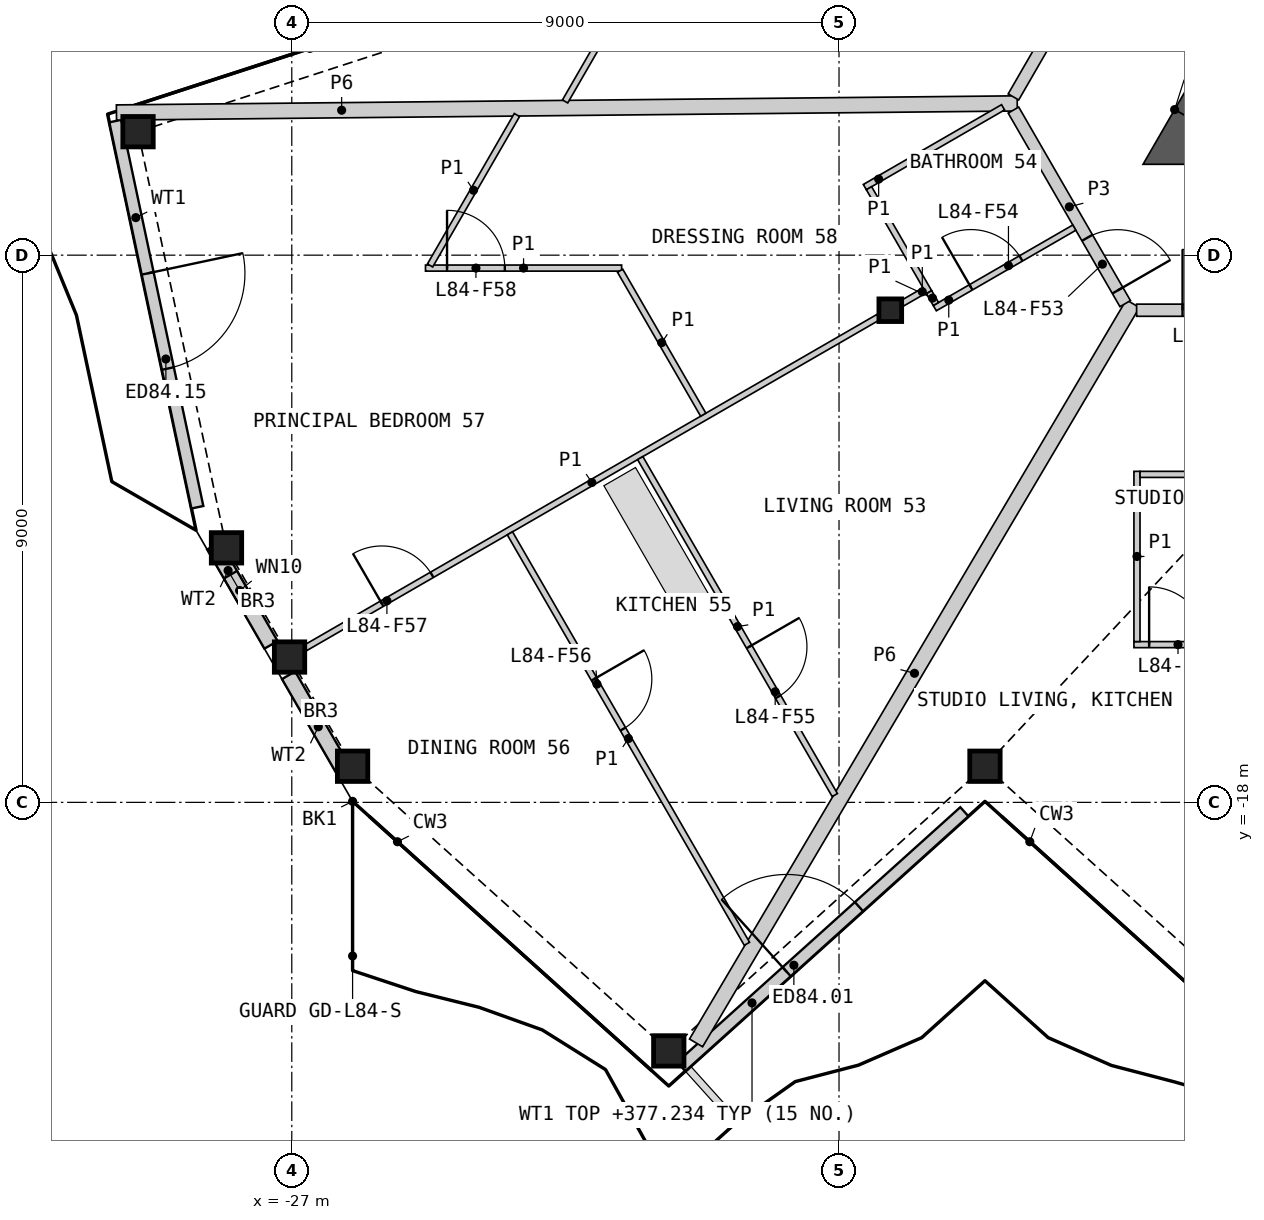
"""IFC4 building model, lengths in metres.
Left out: names, types, materials, properties, quantities, classifications, styles, units other than length and angle.
Written with IfcOpenShell. Run it as: python <this file> out.ifc"""

import sys

from ifc_helpers import new_model, si_unit, direction, frame, frame_2d, origin, origin_2d, place, context, subcontext, project, spatial, polyline, rectangle, hollow_rectangle, i_section, outline, extrude, element, fill, save


model = new_model("IFC4")
c1 = context("Model", 3, precision=1e-05, world=origin(), true_north=direction((0.0, 1.0)))
c2 = subcontext(c1, "Body", "Model", "MODEL_VIEW")
j1 = project(units=[si_unit("LENGTHUNIT", "METRE"), si_unit("PLANEANGLEUNIT", "RADIAN")], contexts=[c1])
p1 = place(None, origin())
s1 = spatial("IfcSite", under=j1, at=p1, CompositionType="ELEMENT")
p2 = place(p1, origin())
s2 = spatial("IfcBuilding", under=s1, at=p2, CompositionType="ELEMENT")
p3 = place(p2, frame((0.0, 0.0, 374.6)))
s3 = spatial("IfcBuildingStorey", under=s2, at=p3, CompositionType="ELEMENT", Elevation=374.6)
for number, where, z_axis, x_axis in (
    (1, (-26.0, -17.406, 0.0), (0.0, 0.0, 1.0), (1.0, 0.0, 0.0)),
    (2, (-20.8, -22.088, 0.0), (0.0, 0.0, 1.0), (1.0, 0.0, 0.0)),
    (3, (-15.6, -17.406, 0.0), (0.0, 0.0, 1.0), (1.0, 0.0, 0.0)),
    (4, (-29.529, -6.969, 0.0), (0.0, 0.0, 1.0), (1.0, 0.0, 0.0)),
    (5, (-28.074, -13.814, 0.0), (0.0, 0.0, 1.0), (1.0, 0.0, 0.0)),
    (6, (-27.037, -15.61, 0.0), (0.0, 0.0, 1.0), (1.0, 0.0, 0.0)),
):
    element("IfcColumn", number, at=place(p3, frame(where, z_axis=z_axis, x_axis=x_axis)), inside=s3, PredefinedType="COLUMN", context=c2, shape_type="SweptSolid", body=[
        extrude(hollow_rectangle(XDim=0.5, YDim=0.5, WallThickness=0.03, at=origin_2d()), origin(), (0.0, 0.0, 1.0), 3.4),
    ])
p4 = place(p3, frame((-17.157, -9.906, 0.0), z_axis=(0.0, 0.0, 1.0), x_axis=(1.0, 0.0, 0.0)))
e7 = element("IfcColumn", 7, at=p4, inside=s3, PredefinedType="COLUMN", context=c2, shape_type="SweptSolid", body=[
    extrude(i_section(OverallWidth=0.374, OverallDepth=0.372, WebThickness=0.016, FlangeThickness=0.026, at=origin_2d()), origin(), (0.0, 0.0, 1.0), 3.4),
])
p5 = place(p3, frame((-20.595, -22.346, 0.0), z_axis=(0.0, 0.0, 1.0), x_axis=(0.743137181878, 0.669139095339, 0.0)))
e8 = element("IfcWall", 8, at=p5, inside=s3, PredefinedType="SOLIDWALL", context=c2, shape_type="SweptSolid", body=[
    extrude(rectangle(XDim=6.265, YDim=0.2, at=frame_2d((3.133, 0.0))), origin(), (0.0, 0.0, 1.0), 2.634),
])
p6 = place(p5, frame((2.333, 0.0, 0.0)))
e9 = element("IfcOpeningElement", 9, at=p6, cuts=e8, PredefinedType="OPENING", context=c2, shape_type="SweptSolid", body=[
    extrude(rectangle(XDim=1.6, YDim=2.25, at=frame_2d((0.8, 1.125))), frame((0.0, 0.11, 0.0), z_axis=(0.0, -1.0, 0.0), x_axis=(1.0, 0.0, 0.0)), (0.0, 0.0, 1.0), 0.22),
])
p7 = place(p3, frame((-29.903, -6.795, 0.0), z_axis=(0.0, 0.0, 1.0), x_axis=(0.207923959653, -0.978144992832, 0.0)))
e10 = element("IfcWall", 10, at=p7, inside=s3, PredefinedType="SOLIDWALL", context=c2, shape_type="SweptSolid", body=[
    extrude(rectangle(XDim=6.493, YDim=0.2, at=frame_2d((3.247, 0.0))), origin(), (0.0, 0.0, 1.0), 2.634),
])
p8 = place(p7, frame((2.561, 0.0, 0.0)))
e11 = element("IfcOpeningElement", 11, at=p8, cuts=e10, PredefinedType="OPENING", context=c2, shape_type="SweptSolid", body=[
    extrude(rectangle(XDim=1.6, YDim=2.25, at=frame_2d((0.8, 1.125))), frame((0.0, 0.11, 0.0), z_axis=(0.0, -1.0, 0.0), x_axis=(1.0, 0.0, 0.0)), (0.0, 0.0, 1.0), 0.22),
])
p9 = place(p3, frame((-28.283, -13.779, 0.0), z_axis=(0.0, 0.0, 1.0), x_axis=(0.500044242988, -0.865999858577, 0.0)))
e12 = element("IfcWall", 12, at=p9, inside=s3, PredefinedType="SOLIDWALL", context=c2, shape_type="SweptSolid", body=[
    extrude(rectangle(XDim=1.883, YDim=0.25, at=frame_2d((0.941, 0.0))), origin(), (0.0, 0.0, 1.0), 2.634),
])
p10 = place(p9, frame((0.55, 0.0, 0.4)))
e13 = element("IfcOpeningElement", 13, at=p10, cuts=e12, PredefinedType="OPENING", context=c2, shape_type="SweptSolid", body=[
    extrude(rectangle(XDim=0.6, YDim=0.6, at=frame_2d((0.3, 0.3))), frame((0.0, 0.135, 0.0), z_axis=(0.0, -1.0, 0.0), x_axis=(1.0, 0.0, 0.0)), (0.0, 0.0, 1.0), 0.27),
])
p11 = place(p3, frame((-27.053, -15.91, 0.0), z_axis=(0.0, 0.0, 1.0), x_axis=(0.500017700655, -0.866015184065, 0.0)))
e14 = element("IfcWall", 14, at=p11, inside=s3, PredefinedType="SOLIDWALL", context=c2, shape_type="SweptSolid", body=[
    extrude(rectangle(XDim=1.957, YDim=0.25, at=frame_2d((0.978, 0.0))), origin(), (0.0, 0.0, 1.0), 2.634),
])
p12 = place(p3, frame((-9.941, -2.807, 0.0), z_axis=(0.0, 0.0, 1.0), x_axis=(-0.500020646047, -0.866013483456, 0.0)))
e15 = element("IfcWall", 15, at=p12, inside=s3, PredefinedType="SHEAR", context=c2, shape_type="SweptSolid", body=[
    extrude(rectangle(XDim=4.559, YDim=0.6, at=frame_2d((2.28, 0.0))), origin(), (0.0, 0.0, 1.0), 3.1),
])
p13 = place(p3, origin())
e16 = element("IfcWall", 16, at=p13, inside=s3, PredefinedType="SHEAR", context=c2, shape_type="SweptSolid", body=[
    extrude(outline(polyline([(-12.48, -6.606), (-11.961, -6.906), (-11.961, -7.506), (-13.0, -7.506), (-12.48, -6.606)])), origin(), (0.0, 0.0, 1.0), 3.1),
])
p14 = place(p3, frame((-29.883, -6.654, 0.0), z_axis=(0.0, 0.0, 1.0), x_axis=(0.999949143254, 0.010085182526, 0.0)))
e17 = element("IfcWall", 17, at=p14, inside=s3, PredefinedType="PARTITIONING", context=c2, shape_type="SweptSolid", body=[
    extrude(rectangle(XDim=14.815, YDim=0.25, at=frame_2d((7.408, 0.0))), origin(), (0.0, 0.0, 1.0), 2.33),
])
p15 = place(p3, frame((-20.351, -21.956, 0.0), z_axis=(0.0, 0.0, 1.0), x_axis=(0.508713003719, 0.860936164793, 0.0)))
e18 = element("IfcWall", 18, at=p15, inside=s3, PredefinedType="PARTITIONING", context=c2, shape_type="SweptSolid", body=[
    extrude(rectangle(XDim=14.122, YDim=0.25, at=frame_2d((7.061, 0.0))), origin(), (0.0, 0.0, 1.0), 2.33),
])
p16 = place(p3, frame((-13.106, -9.906, 0.0), z_axis=(0.0, 0.0, 1.0), x_axis=(1.0, 0.0, 0.0)))
e19 = element("IfcWall", 19, at=p16, inside=s3, PredefinedType="PARTITIONING", context=c2, shape_type="SweptSolid", body=[
    extrude(rectangle(XDim=4.331, YDim=0.2, at=frame_2d((2.165, 0.0))), origin(), (0.0, 0.0, 1.0), 3.1),
])
p17 = place(p16, frame((0.755, 0.0, 0.0)))
e20 = element("IfcOpeningElement", 20, at=p17, cuts=e19, PredefinedType="OPENING", context=c2, shape_type="SweptSolid", body=[
    extrude(rectangle(XDim=1.0, YDim=2.1, at=frame_2d((0.5, 1.05))), frame((0.0, 0.11, 0.0), z_axis=(0.0, -1.0, 0.0), x_axis=(1.0, 0.0, 0.0)), (0.0, 0.0, 1.0), 0.22),
])
p18 = place(p3, frame((-15.131, -6.397, 0.0), z_axis=(0.0, 0.0, 1.0), x_axis=(0.499986217557, 0.866033360935, 0.0)))
e21 = element("IfcWall", 21, at=p18, inside=s3, PredefinedType="PARTITIONING", context=c2, shape_type="SweptSolid", body=[
    extrude(rectangle(XDim=4.3, YDim=0.2, at=frame_2d((2.15, 0.0))), origin(), (0.0, 0.0, 1.0), 3.1),
])
p19 = place(p3, frame((-15.131, -6.614, 0.0), z_axis=(0.0, 0.0, 1.0), x_axis=(0.499967746641, -0.866044024469, 0.0)))
e22 = element("IfcWall", 22, at=p19, inside=s3, PredefinedType="PARTITIONING", context=c2, shape_type="SweptSolid", body=[
    extrude(rectangle(XDim=3.676, YDim=0.2, at=frame_2d((1.838, 0.0))), origin(), (0.0, 0.0, 1.0), 3.1),
])
p20 = place(p19, frame((2.426, 0.0, 0.0)))
e23 = element("IfcOpeningElement", 23, at=p20, cuts=e22, PredefinedType="OPENING", context=c2, shape_type="SweptSolid", body=[
    extrude(rectangle(XDim=1.0, YDim=2.1, at=frame_2d((0.5, 1.05))), frame((0.0, 0.11, 0.0), z_axis=(0.0, -1.0, 0.0), x_axis=(1.0, 0.0, 0.0)), (0.0, 0.0, 1.0), 0.22),
])
p21 = place(p3, frame((-26.777, -15.46, 0.0), z_axis=(0.0, 0.0, 1.0), x_axis=(0.866019680922, 0.500009912158, 0.0)))
e24 = element("IfcWall", 24, at=p21, inside=s3, PredefinedType="PARTITIONING", context=c2, shape_type="SweptSolid", body=[
    extrude(rectangle(XDim=10.881, YDim=0.1, at=frame_2d((5.44, 0.0))), origin(), (0.0, 0.0, 1.0), 2.33),
])
p22 = place(p21, frame((1.454, 0.0, 0.0)))
e25 = element("IfcOpeningElement", 25, at=p22, cuts=e24, PredefinedType="OPENING", context=c2, shape_type="SweptSolid", body=[
    extrude(rectangle(XDim=0.95, YDim=2.1, at=frame_2d((0.475, 1.05))), frame((0.0, 0.06, 0.0), z_axis=(0.0, -1.0, 0.0), x_axis=(1.0, 0.0, 0.0)), (0.0, 0.0, 1.0), 0.12),
])
p23 = place(p3, frame((-23.413, -13.575, 0.0), z_axis=(0.0, 0.0, 1.0), x_axis=(0.499998958472, -0.86602600511, 0.0)))
e26 = element("IfcWall", 26, at=p23, inside=s3, PredefinedType="PARTITIONING", context=c2, shape_type="SweptSolid", body=[
    extrude(rectangle(XDim=7.796, YDim=0.1, at=frame_2d((3.898, 0.0))), origin(), (0.0, 0.0, 1.0), 2.33),
])
p24 = place(p23, frame((2.768, 0.0, 0.0)))
e27 = element("IfcOpeningElement", 27, at=p24, cuts=e26, PredefinedType="OPENING", context=c2, shape_type="SweptSolid", body=[
    extrude(rectangle(XDim=0.95, YDim=2.1, at=frame_2d((0.475, 1.05))), frame((0.0, 0.06, 0.0), z_axis=(0.0, -1.0, 0.0), x_axis=(1.0, 0.0, 0.0)), (0.0, 0.0, 1.0), 0.12),
])
p25 = place(p3, frame((-22.505, -6.472, 0.0), z_axis=(0.0, 0.0, 1.0), x_axis=(0.499999516514, 0.866025682925, 0.0)))
e28 = element("IfcWall", 28, at=p25, inside=s3, PredefinedType="PARTITIONING", context=c2, shape_type="SweptSolid", body=[
    extrude(rectangle(XDim=6.407, YDim=0.1, at=frame_2d((3.204, 0.0))), origin(), (0.0, 0.0, 1.0), 2.33),
])
p26 = place(p25, frame((2.981, 0.0, 0.0)))
e29 = element("IfcOpeningElement", 29, at=p26, cuts=e28, PredefinedType="OPENING", context=c2, shape_type="SweptSolid", body=[
    extrude(rectangle(XDim=0.95, YDim=2.1, at=frame_2d((0.475, 1.05))), frame((0.0, 0.06, 0.0), z_axis=(0.0, -1.0, 0.0), x_axis=(1.0, 0.0, 0.0)), (0.0, 0.0, 1.0), 0.12),
])
p27 = place(p3, frame((-21.269, -12.337, 0.0), z_axis=(0.0, 0.0, 1.0), x_axis=(0.499983315828, -0.866035036182, 0.0)))
e30 = element("IfcWall", 30, at=p27, inside=s3, PredefinedType="PARTITIONING", context=c2, shape_type="SweptSolid", body=[
    extrude(rectangle(XDim=6.4, YDim=0.1, at=frame_2d((3.2, 0.0))), origin(), (0.0, 0.0, 1.0), 2.33),
])
p28 = place(p27, frame((3.584, 0.0, 0.0)))
e31 = element("IfcOpeningElement", 31, at=p28, cuts=e30, PredefinedType="OPENING", context=c2, shape_type="SweptSolid", body=[
    extrude(rectangle(XDim=0.95, YDim=2.1, at=frame_2d((0.475, 1.05))), frame((0.0, 0.06, 0.0), z_axis=(0.0, -1.0, 0.0), x_axis=(1.0, 0.0, 0.0)), (0.0, 0.0, 1.0), 0.12),
])
p29 = place(p3, frame((-13.15, -15.406, 0.0), z_axis=(0.0, 0.0, 1.0), x_axis=(1.0, 0.0, 0.0)))
e32 = element("IfcWall", 32, at=p29, inside=s3, PredefinedType="PARTITIONING", context=c2, shape_type="SweptSolid", body=[
    extrude(rectangle(XDim=5.5, YDim=0.1, at=frame_2d((2.75, 0.0))), origin(), (0.0, 0.0, 1.0), 2.33),
])
p30 = place(p29, frame((0.25, 0.0, 0.0)))
e33 = element("IfcOpeningElement", 33, at=p30, cuts=e32, PredefinedType="OPENING", context=c2, shape_type="SweptSolid", body=[
    extrude(rectangle(XDim=0.95, YDim=2.1, at=frame_2d((0.475, 1.05))), frame((0.0, 0.06, 0.0), z_axis=(0.0, -1.0, 0.0), x_axis=(1.0, 0.0, 0.0)), (0.0, 0.0, 1.0), 0.12),
])
p31 = place(p29, frame((3.591, 0.0, 0.0)))
e34 = element("IfcOpeningElement", 34, at=p31, cuts=e32, PredefinedType="OPENING", context=c2, shape_type="SweptSolid", body=[
    extrude(rectangle(XDim=0.95, YDim=2.1, at=frame_2d((0.475, 1.05))), frame((0.0, 0.06, 0.0), z_axis=(0.0, -1.0, 0.0), x_axis=(1.0, 0.0, 0.0)), (0.0, 0.0, 1.0), 0.12),
])
p32 = place(p3, frame((-24.801, -9.212, 0.0), z_axis=(0.0, 0.0, 1.0), x_axis=(1.0, 0.0, 0.0)))
e35 = element("IfcWall", 35, at=p32, inside=s3, PredefinedType="PARTITIONING", context=c2, shape_type="SweptSolid", body=[
    extrude(rectangle(XDim=3.226, YDim=0.1, at=frame_2d((1.613, 0.0))), origin(), (0.0, 0.0, 1.0), 2.33),
])
p33 = place(p32, frame((0.354, 0.0, 0.0)))
e36 = element("IfcOpeningElement", 36, at=p33, cuts=e35, PredefinedType="OPENING", context=c2, shape_type="SweptSolid", body=[
    extrude(rectangle(XDim=0.95, YDim=2.1, at=frame_2d((0.475, 1.05))), frame((0.0, 0.06, 0.0), z_axis=(0.0, -1.0, 0.0), x_axis=(1.0, 0.0, 0.0)), (0.0, 0.0, 1.0), 0.12),
])
p34 = place(p3, frame((-24.726, -9.169, 0.0), z_axis=(0.0, 0.0, 1.0), x_axis=(0.499971481985, 0.866041868042, 0.0)))
e37 = element("IfcWall", 37, at=p34, inside=s3, PredefinedType="PARTITIONING", context=c2, shape_type="SweptSolid", body=[
    extrude(rectangle(XDim=2.857, YDim=0.1, at=frame_2d((1.429, 0.0))), origin(), (0.0, 0.0, 1.0), 2.33),
])
p35 = place(p3, frame((-21.6, -9.256, 0.0), z_axis=(0.0, 0.0, 1.0), x_axis=(0.500018733116, -0.866014587945, 0.0)))
e38 = element("IfcWall", 38, at=p35, inside=s3, PredefinedType="PARTITIONING", context=c2, shape_type="SweptSolid", body=[
    extrude(rectangle(XDim=2.734, YDim=0.1, at=frame_2d((1.367, 0.0))), origin(), (0.0, 0.0, 1.0), 2.33),
])
p36 = place(p3, frame((-13.1, -15.356, 0.0), z_axis=(0.0, 0.0, 1.0), x_axis=(0.0, 1.0, 0.0)))
e39 = element("IfcWall", 39, at=p36, inside=s3, PredefinedType="PARTITIONING", context=c2, shape_type="SweptSolid", body=[
    extrude(rectangle(XDim=2.8, YDim=0.1, at=frame_2d((1.4, 0.0))), origin(), (0.0, 0.0, 1.0), 2.33),
])
p37 = place(p3, frame((-17.575, -7.881, 0.0), z_axis=(0.0, 0.0, 1.0), x_axis=(0.866036909293, 0.499980071345, 0.0)))
e40 = element("IfcWall", 40, at=p37, inside=s3, PredefinedType="PARTITIONING", context=c2, shape_type="SweptSolid", body=[
    extrude(rectangle(XDim=2.625, YDim=0.1, at=frame_2d((1.312, 0.0))), origin(), (0.0, 0.0, 1.0), 2.33),
])
p38 = place(p3, frame((-13.05, -12.606, 0.0), z_axis=(0.0, 0.0, 1.0), x_axis=(1.0, 0.0, 0.0)))
e41 = element("IfcWall", 41, at=p38, inside=s3, PredefinedType="PARTITIONING", context=c2, shape_type="SweptSolid", body=[
    extrude(rectangle(XDim=2.525, YDim=0.1, at=frame_2d((1.263, 0.0))), origin(), (0.0, 0.0, 1.0), 2.33),
])
p39 = place(p3, frame((-16.425, -9.872, 0.0), z_axis=(0.0, 0.0, 1.0), x_axis=(0.86603978909, 0.499975083092, 0.0)))
e42 = element("IfcWall", 42, at=p39, inside=s3, PredefinedType="PARTITIONING", context=c2, shape_type="SweptSolid", body=[
    extrude(rectangle(XDim=2.649, YDim=0.1, at=frame_2d((1.325, 0.0))), origin(), (0.0, 0.0, 1.0), 2.33),
])
p40 = place(p39, frame((0.686, 0.0, 0.0)))
e43 = element("IfcOpeningElement", 43, at=p40, cuts=e42, PredefinedType="OPENING", context=c2, shape_type="SweptSolid", body=[
    extrude(rectangle(XDim=0.95, YDim=2.1, at=frame_2d((0.475, 1.05))), frame((0.0, 0.06, 0.0), z_axis=(0.0, -1.0, 0.0), x_axis=(1.0, 0.0, 0.0)), (0.0, 0.0, 1.0), 0.12),
])
p41 = place(p3, frame((-17.507, -7.899, 0.0), z_axis=(0.0, 0.0, 1.0), x_axis=(0.500011643316, -0.866018681408, 0.0)))
e44 = element("IfcWall", 44, at=p41, inside=s3, PredefinedType="PARTITIONING", context=c2, shape_type="SweptSolid", body=[
    extrude(rectangle(XDim=1.973, YDim=0.1, at=frame_2d((0.987, 0.0))), origin(), (0.0, 0.0, 1.0), 2.33),
])
p42 = place(p3, frame((-16.96, -9.792, 0.0), z_axis=(0.0, 0.0, 1.0), x_axis=(0.866137484628, 0.499805820016, 0.0)))
e45 = element("IfcWall", 45, at=p42, inside=s3, PredefinedType="PARTITIONING", context=c2, shape_type="SweptSolid", body=[
    extrude(rectangle(XDim=0.423, YDim=0.1, at=frame_2d((0.211, 0.0))), origin(), (0.0, 0.0, 1.0), 2.33),
])
p43 = place(p3, frame((-16.519, -9.61, 0.0), z_axis=(0.0, 0.0, 1.0), x_axis=(0.50245032488, -0.864606078528, 0.0)))
e46 = element("IfcWall", 46, at=p43, inside=s3, PredefinedType="PARTITIONING", context=c2, shape_type="SweptSolid", body=[
    extrude(rectangle(XDim=0.224, YDim=0.1, at=frame_2d((0.112, 0.0))), origin(), (0.0, 0.0, 1.0), 2.33),
])
p44 = place(p6, origin())
e47 = element("IfcDoor", 47, at=p44, inside=s3, OperationType="DOUBLE_DOOR_SINGLE_SWING", PredefinedType="DOOR", context=c2, shape_type="SweptSolid", body=[
    extrude(rectangle(XDim=1.6, YDim=2.25, at=frame_2d((0.8, 1.125))), frame((0.0, 0.025, 0.0), z_axis=(0.0, -1.0, 0.0), x_axis=(1.0, 0.0, 0.0)), (0.0, 0.0, 1.0), 0.05),
])
fill(e9, e47)
p45 = place(p8, origin())
e48 = element("IfcDoor", 48, at=p45, inside=s3, OperationType="DOUBLE_DOOR_SINGLE_SWING", PredefinedType="DOOR", context=c2, shape_type="SweptSolid", body=[
    extrude(rectangle(XDim=1.6, YDim=2.25, at=frame_2d((0.8, 1.125))), frame((0.0, 0.025, 0.0), z_axis=(0.0, -1.0, 0.0), x_axis=(1.0, 0.0, 0.0)), (0.0, 0.0, 1.0), 0.05),
])
fill(e11, e48)
p46 = place(p10, origin())
e49 = element("IfcWindow", 49, at=p46, inside=s3, PartitioningType="SINGLE_PANEL", PredefinedType="WINDOW", context=c2, shape_type="SweptSolid", body=[
    extrude(rectangle(XDim=0.6, YDim=0.6, at=frame_2d((0.3, 0.3))), frame((0.0, 0.03, 0.0), z_axis=(0.0, -1.0, 0.0), x_axis=(1.0, 0.0, 0.0)), (0.0, 0.0, 1.0), 0.06),
])
fill(e13, e49)
p47 = place(p17, origin())
e50 = element("IfcDoor", 50, at=p47, inside=s3, OperationType="SINGLE_SWING_LEFT", PredefinedType="DOOR", context=c2, shape_type="SweptSolid", body=[
    extrude(rectangle(XDim=1.0, YDim=2.1, at=frame_2d((0.5, 1.05))), frame((0.0, 0.025, 0.0), z_axis=(0.0, -1.0, 0.0), x_axis=(1.0, 0.0, 0.0)), (0.0, 0.0, 1.0), 0.05),
])
fill(e20, e50)
p48 = place(p30, origin())
e51 = element("IfcDoor", 51, at=p48, inside=s3, OperationType="SINGLE_SWING_LEFT", PredefinedType="DOOR", context=c2, shape_type="SweptSolid", body=[
    extrude(rectangle(XDim=0.95, YDim=2.1, at=frame_2d((0.475, 1.05))), frame((0.0, 0.025, 0.0), z_axis=(0.0, -1.0, 0.0), x_axis=(1.0, 0.0, 0.0)), (0.0, 0.0, 1.0), 0.05),
])
fill(e33, e51)
p49 = place(p20, origin())
e52 = element("IfcDoor", 52, at=p49, inside=s3, OperationType="SINGLE_SWING_RIGHT", PredefinedType="DOOR", context=c2, shape_type="SweptSolid", body=[
    extrude(rectangle(XDim=1.0, YDim=2.1, at=frame_2d((0.5, 1.05))), frame((0.0, 0.025, 0.0), z_axis=(0.0, -1.0, 0.0), x_axis=(1.0, 0.0, 0.0)), (0.0, 0.0, 1.0), 0.05),
])
fill(e23, e52)
p50 = place(p40, origin())
e53 = element("IfcDoor", 53, at=p50, inside=s3, OperationType="SINGLE_SWING_LEFT", PredefinedType="DOOR", context=c2, shape_type="SweptSolid", body=[
    extrude(rectangle(XDim=0.95, YDim=2.1, at=frame_2d((0.475, 1.05))), frame((0.0, 0.025, 0.0), z_axis=(0.0, -1.0, 0.0), x_axis=(1.0, 0.0, 0.0)), (0.0, 0.0, 1.0), 0.05),
])
fill(e43, e53)
p51 = place(p28, origin())
e54 = element("IfcDoor", 54, at=p51, inside=s3, OperationType="SINGLE_SWING_LEFT", PredefinedType="DOOR", context=c2, shape_type="SweptSolid", body=[
    extrude(rectangle(XDim=0.95, YDim=2.1, at=frame_2d((0.475, 1.05))), frame((0.0, 0.025, 0.0), z_axis=(0.0, -1.0, 0.0), x_axis=(1.0, 0.0, 0.0)), (0.0, 0.0, 1.0), 0.05),
])
fill(e31, e54)
p52 = place(p24, origin())
e55 = element("IfcDoor", 55, at=p52, inside=s3, OperationType="SINGLE_SWING_LEFT", PredefinedType="DOOR", context=c2, shape_type="SweptSolid", body=[
    extrude(rectangle(XDim=0.95, YDim=2.1, at=frame_2d((0.475, 1.05))), frame((0.0, 0.025, 0.0), z_axis=(0.0, -1.0, 0.0), x_axis=(1.0, 0.0, 0.0)), (0.0, 0.0, 1.0), 0.05),
])
fill(e27, e55)
p53 = place(p22, origin())
e56 = element("IfcDoor", 56, at=p53, inside=s3, OperationType="SINGLE_SWING_LEFT", PredefinedType="DOOR", context=c2, shape_type="SweptSolid", body=[
    extrude(rectangle(XDim=0.95, YDim=2.1, at=frame_2d((0.475, 1.05))), frame((0.0, 0.025, 0.0), z_axis=(0.0, -1.0, 0.0), x_axis=(1.0, 0.0, 0.0)), (0.0, 0.0, 1.0), 0.05),
])
fill(e25, e56)
p54 = place(p33, origin())
e57 = element("IfcDoor", 57, at=p54, inside=s3, OperationType="SINGLE_SWING_LEFT", PredefinedType="DOOR", context=c2, shape_type="SweptSolid", body=[
    extrude(rectangle(XDim=0.95, YDim=2.1, at=frame_2d((0.475, 1.05))), frame((0.0, 0.025, 0.0), z_axis=(0.0, -1.0, 0.0), x_axis=(1.0, 0.0, 0.0)), (0.0, 0.0, 1.0), 0.05),
])
fill(e36, e57)
save(model, sys.argv[1])
